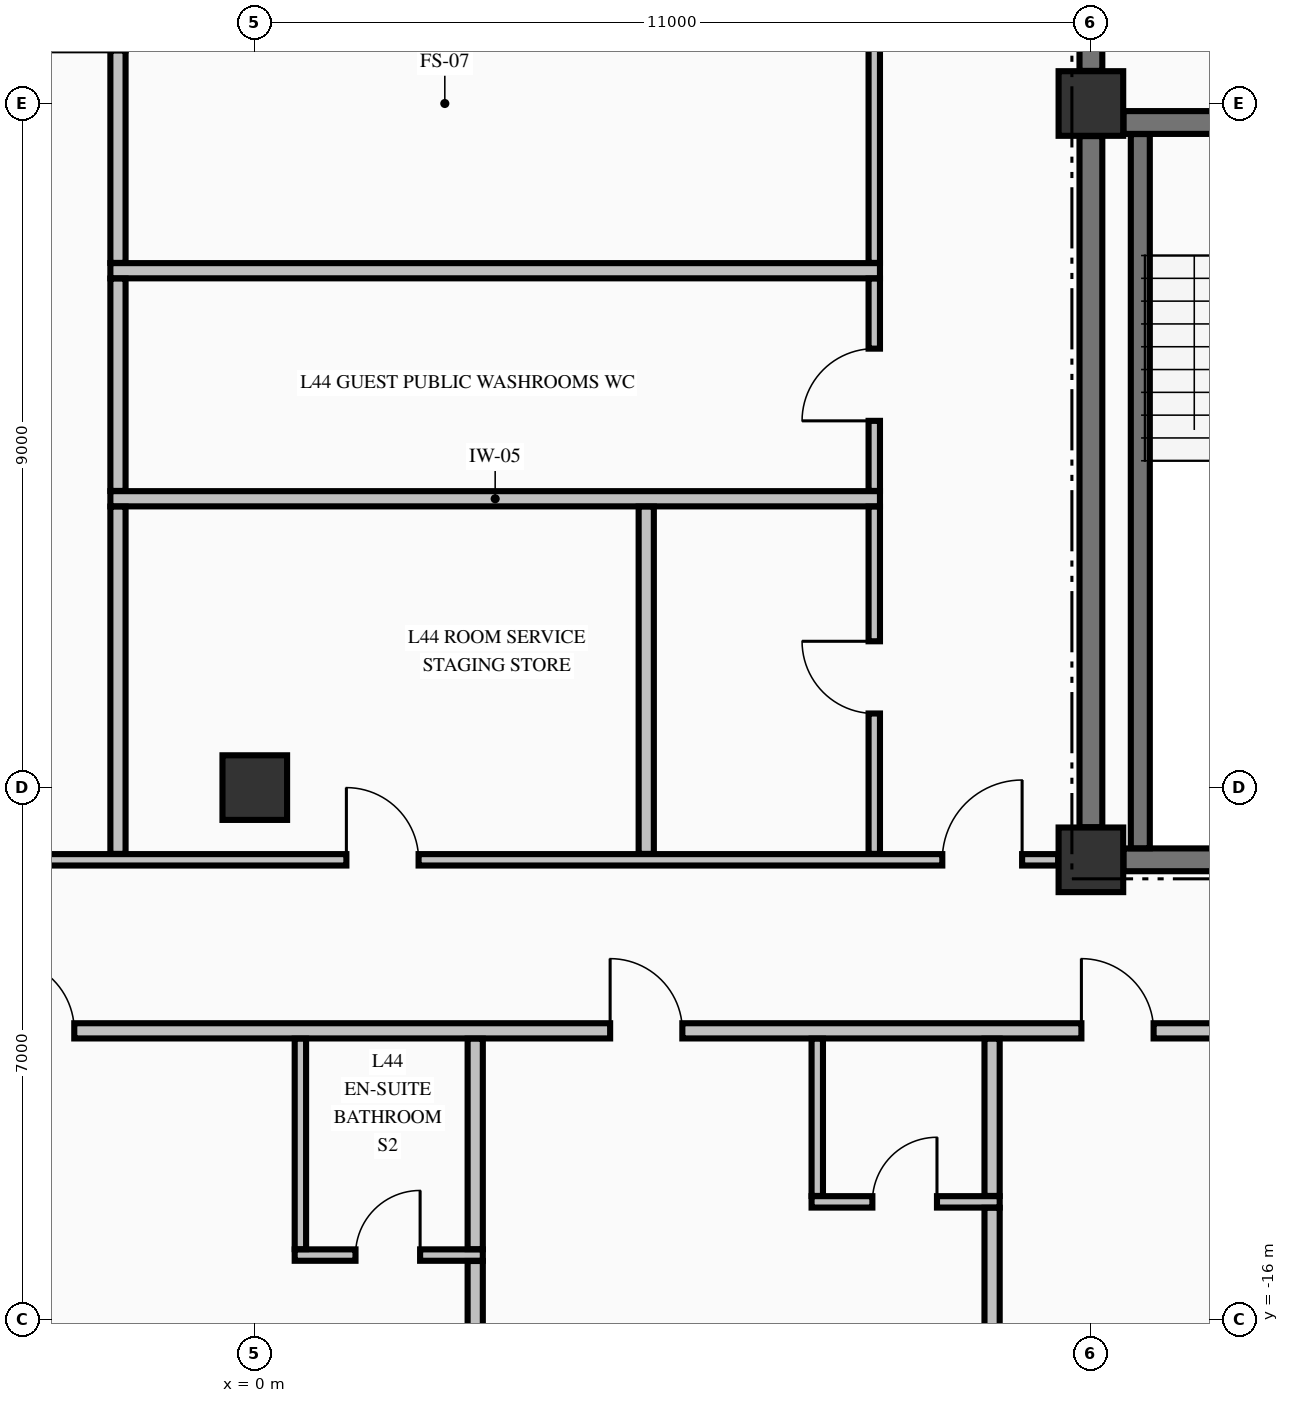
"""IFC4 building model, lengths in metres.
Left out: names, types, materials, properties, quantities, classifications, styles, units other than length and angle.
Written with IfcOpenShell. Run it as: python <this file> out.ifc"""

import sys

from ifc_helpers import new_model, si_unit, direction, frame, frame_2d, origin, origin_2d, place, context, subcontext, project, spatial, rectangle, extrude, element, fill, save


model = new_model("IFC4")
c1 = context("Model", 3, precision=1e-05, world=origin(), true_north=direction((0.0, 1.0)))
c2 = subcontext(c1, "Body", "Model", "MODEL_VIEW")
j1 = project(units=[si_unit("LENGTHUNIT", "METRE"), si_unit("PLANEANGLEUNIT", "RADIAN")], contexts=[c1])
p1 = place(None, origin())
s1 = spatial("IfcSite", under=j1, at=p1, CompositionType="ELEMENT")
p2 = place(p1, origin())
s2 = spatial("IfcBuilding", under=s1, at=p2, CompositionType="ELEMENT")
p3 = place(p2, frame((0.0, 0.0, 172.86)))
s3 = spatial("IfcBuildingStorey", under=s2, at=p3, CompositionType="ELEMENT", Elevation=172.86)
for number, where, z_axis, x_axis in (
    (1, (11.0, -9.95, -0.25), (0.0, 0.0, 1.0), (1.0, 0.0, 0.0)),
    (2, (11.0, 0.0, -0.25), (0.0, 0.0, 1.0), (1.0, 0.0, 0.0)),
    (3, (0.0, -9.0, -0.25), (0.0, 0.0, 1.0), (1.0, 0.0, 0.0)),
):
    element("IfcColumn", number, at=place(p3, frame(where, z_axis=z_axis, x_axis=x_axis)), inside=s3, PredefinedType="COLUMN", context=c2, shape_type="SweptSolid", body=[
        extrude(rectangle(XDim=0.85, YDim=0.85, at=origin_2d()), origin(), (0.0, 0.0, 1.0), 3.375),
    ])
p4 = place(p3, frame((11.429, -9.95, 0.0), z_axis=(0.0, 0.0, 1.0), x_axis=(1.0, 0.0, 0.0)))
e4 = element("IfcWall", 4, at=p4, inside=s3, PredefinedType="SHEAR", context=c2, shape_type="SweptSolid", body=[
    extrude(rectangle(XDim=3.271, YDim=0.3, at=frame_2d((1.635, 0.0))), origin(), (0.0, 0.0, 1.0), 3.125),
])
p5 = place(p3, frame((11.429, -0.25, 0.0), z_axis=(0.0, 0.0, 1.0), x_axis=(1.0, 0.0, 0.0)))
e5 = element("IfcWall", 5, at=p5, inside=s3, PredefinedType="SHEAR", context=c2, shape_type="SweptSolid", body=[
    extrude(rectangle(XDim=3.446, YDim=0.3, at=frame_2d((1.723, 0.0))), origin(), (0.0, 0.0, 1.0), 3.125),
])
p6 = place(p5, frame((1.171, 0.0, 0.0)))
e6 = element("IfcOpeningElement", 6, at=p6, cuts=e5, PredefinedType="OPENING", context=c2, shape_type="SweptSolid", body=[
    extrude(rectangle(XDim=1.1, YDim=2.15, at=frame_2d((0.55, 1.075))), frame((0.0, 0.16, 0.0), z_axis=(0.0, -1.0, 0.0), x_axis=(1.0, 0.0, 0.0)), (0.0, 0.0, 1.0), 0.32),
])
p7 = place(p3, frame((0.525, -15.15, 0.0), z_axis=(0.0, 0.0, 1.0), x_axis=(1.0, 0.0, 0.0)))
e7 = element("IfcWall", 7, at=p7, inside=s3, PredefinedType="PARTITIONING", context=c2, shape_type="SweptSolid", body=[
    extrude(rectangle(XDim=2.475, YDim=0.15, at=frame_2d((1.238, 0.0))), origin(), (0.0, 0.0, 1.0), 3.125),
])
p8 = place(p7, frame((0.8, 0.0, 0.0)))
e8 = element("IfcOpeningElement", 8, at=p8, cuts=e7, PredefinedType="OPENING", context=c2, shape_type="SweptSolid", body=[
    extrude(rectangle(XDim=0.85, YDim=2.1, at=frame_2d((0.425, 1.05))), frame((0.0, 0.085, 0.0), z_axis=(0.0, -1.0, 0.0), x_axis=(1.0, 0.0, 0.0)), (0.0, 0.0, 1.0), 0.17),
])
p9 = place(p3, frame((7.325, -14.45, 0.0), z_axis=(0.0, 0.0, 1.0), x_axis=(1.0, 0.0, 0.0)))
e9 = element("IfcWall", 9, at=p9, inside=s3, PredefinedType="PARTITIONING", context=c2, shape_type="SweptSolid", body=[
    extrude(rectangle(XDim=2.475, YDim=0.15, at=frame_2d((1.238, 0.0))), origin(), (0.0, 0.0, 1.0), 2.665),
])
p10 = place(p9, frame((0.8, 0.0, 0.0)))
e10 = element("IfcOpeningElement", 10, at=p10, cuts=e9, PredefinedType="OPENING", context=c2, shape_type="SweptSolid", body=[
    extrude(rectangle(XDim=0.85, YDim=2.1, at=frame_2d((0.425, 1.05))), frame((0.0, 0.085, 0.0), z_axis=(0.0, -1.0, 0.0), x_axis=(1.0, 0.0, 0.0)), (0.0, 0.0, 1.0), 0.17),
])
p11 = place(p3, frame((-17.1, -12.2, 0.0), z_axis=(0.0, 0.0, 1.0), x_axis=(1.0, 0.0, 0.0)))
e11 = element("IfcWall", 11, at=p11, inside=s3, PredefinedType="PARTITIONING", context=c2, shape_type="SweptSolid", body=[
    extrude(rectangle(XDim=39.2, YDim=0.2, at=frame_2d((19.6, 0.0))), origin(), (0.0, 0.0, 1.0), 3.125),
])
p12 = place(p11, frame((3.825, 0.0, 0.0)))
e12 = element("IfcOpeningElement", 12, at=p12, cuts=e11, PredefinedType="OPENING", context=c2, shape_type="SweptSolid", body=[
    extrude(rectangle(XDim=0.95, YDim=2.15, at=frame_2d((0.475, 1.075))), frame((0.0, 0.11, 0.0), z_axis=(0.0, -1.0, 0.0), x_axis=(1.0, 0.0, 0.0)), (0.0, 0.0, 1.0), 0.22),
])
p13 = place(p11, frame((13.775, 0.0, 0.0)))
e13 = element("IfcOpeningElement", 13, at=p13, cuts=e11, PredefinedType="OPENING", context=c2, shape_type="SweptSolid", body=[
    extrude(rectangle(XDim=0.95, YDim=2.15, at=frame_2d((0.475, 1.075))), frame((0.0, 0.11, 0.0), z_axis=(0.0, -1.0, 0.0), x_axis=(1.0, 0.0, 0.0)), (0.0, 0.0, 1.0), 0.22),
])
p14 = place(p11, frame((21.775, 0.0, 0.0)))
e14 = element("IfcOpeningElement", 14, at=p14, cuts=e11, PredefinedType="OPENING", context=c2, shape_type="SweptSolid", body=[
    extrude(rectangle(XDim=0.95, YDim=2.15, at=frame_2d((0.475, 1.075))), frame((0.0, 0.11, 0.0), z_axis=(0.0, -1.0, 0.0), x_axis=(1.0, 0.0, 0.0)), (0.0, 0.0, 1.0), 0.22),
])
p15 = place(p11, frame((27.975, 0.0, 0.0)))
e15 = element("IfcOpeningElement", 15, at=p15, cuts=e11, PredefinedType="OPENING", context=c2, shape_type="SweptSolid", body=[
    extrude(rectangle(XDim=0.95, YDim=2.15, at=frame_2d((0.475, 1.075))), frame((0.0, 0.11, 0.0), z_axis=(0.0, -1.0, 0.0), x_axis=(1.0, 0.0, 0.0)), (0.0, 0.0, 1.0), 0.22),
])
p16 = place(p11, frame((34.325, 0.0, 0.0)))
e16 = element("IfcOpeningElement", 16, at=p16, cuts=e11, PredefinedType="OPENING", context=c2, shape_type="SweptSolid", body=[
    extrude(rectangle(XDim=0.95, YDim=2.15, at=frame_2d((0.475, 1.075))), frame((0.0, 0.11, 0.0), z_axis=(0.0, -1.0, 0.0), x_axis=(1.0, 0.0, 0.0)), (0.0, 0.0, 1.0), 0.22),
])
p17 = place(p3, frame((-10.569, -9.95, 0.0), z_axis=(0.0, 0.0, 1.0), x_axis=(1.0, 0.0, 0.0)))
e17 = element("IfcWall", 17, at=p17, inside=s3, PredefinedType="PARTITIONING", context=c2, shape_type="SweptSolid", body=[
    extrude(rectangle(XDim=21.138, YDim=0.15, at=frame_2d((10.569, 0.0))), origin(), (0.0, 0.0, 1.0), 3.125),
])
p18 = place(p17, frame((0.474, 0.0, 0.0)))
e18 = element("IfcOpeningElement", 18, at=p18, cuts=e17, PredefinedType="OPENING", context=c2, shape_type="SweptSolid", body=[
    extrude(rectangle(XDim=1.05, YDim=2.15, at=frame_2d((0.525, 1.075))), frame((0.0, 0.085, 0.0), z_axis=(0.0, -1.0, 0.0), x_axis=(1.0, 0.0, 0.0)), (0.0, 0.0, 1.0), 0.17),
])
p19 = place(p17, frame((19.614, 0.0, 0.0)))
e19 = element("IfcOpeningElement", 19, at=p19, cuts=e17, PredefinedType="OPENING", context=c2, shape_type="SweptSolid", body=[
    extrude(rectangle(XDim=1.05, YDim=2.15, at=frame_2d((0.525, 1.075))), frame((0.0, 0.085, 0.0), z_axis=(0.0, -1.0, 0.0), x_axis=(1.0, 0.0, 0.0)), (0.0, 0.0, 1.0), 0.17),
])
p20 = place(p17, frame((11.774, 0.0, 0.0)))
e20 = element("IfcOpeningElement", 20, at=p20, cuts=e17, PredefinedType="OPENING", context=c2, shape_type="SweptSolid", body=[
    extrude(rectangle(XDim=0.95, YDim=2.15, at=frame_2d((0.475, 1.075))), frame((0.0, 0.085, 0.0), z_axis=(0.0, -1.0, 0.0), x_axis=(1.0, 0.0, 0.0)), (0.0, 0.0, 1.0), 0.17),
])
for number, where, z_axis, x_axis in (
    (21, (-1.9, -5.2, 0.0), (0.0, 0.0, 1.0), (1.0, 0.0, 0.0)),
    (22, (-1.9, -2.2, 0.0), (0.0, 0.0, 1.0), (1.0, 0.0, 0.0)),
):
    element("IfcWall", number, at=place(p3, frame(where, z_axis=z_axis, x_axis=x_axis)), inside=s3, PredefinedType="PARTITIONING", context=c2, shape_type="SweptSolid", body=[
        extrude(rectangle(XDim=10.125, YDim=0.2, at=frame_2d((5.062, 0.0))), origin(), (0.0, 0.0, 1.0), 3.125),
    ])
p21 = place(p3, frame((11.0, -9.521, 0.0), z_axis=(0.0, 0.0, 1.0), x_axis=(0.0, 1.0, 0.0)))
e23 = element("IfcWall", 23, at=p21, inside=s3, PredefinedType="SHEAR", context=c2, shape_type="SweptSolid", body=[
    extrude(rectangle(XDim=9.092, YDim=0.3, at=frame_2d((4.546, 0.0))), origin(), (0.0, 0.0, 1.0), 3.125),
])
p22 = place(p3, frame((11.0, 0.429, 0.0), z_axis=(0.0, 0.0, 1.0), x_axis=(0.0, 1.0, 0.0)))
e24 = element("IfcWall", 24, at=p22, inside=s3, PredefinedType="SHEAR", context=c2, shape_type="SweptSolid", body=[
    extrude(rectangle(XDim=2.319, YDim=0.3, at=frame_2d((1.16, 0.0))), origin(), (0.0, 0.0, 1.0), 3.125),
])
p23 = place(p22, frame((0.671, 0.0, 0.0)))
e25 = element("IfcOpeningElement", 25, at=p23, cuts=e24, PredefinedType="OPENING", context=c2, shape_type="SweptSolid", body=[
    extrude(rectangle(XDim=1.1, YDim=2.15, at=frame_2d((0.55, 1.075))), frame((0.0, 0.16, 0.0), z_axis=(0.0, -1.0, 0.0), x_axis=(1.0, 0.0, 0.0)), (0.0, 0.0, 1.0), 0.32),
])
p24 = place(p3, frame((11.65, -9.798, 0.0), z_axis=(0.0, 0.0, 1.0), x_axis=(0.0, 1.0, 0.0)))
e26 = element("IfcWall", 26, at=p24, inside=s3, PredefinedType="SOLIDWALL", context=c2, shape_type="SweptSolid", body=[
    extrude(rectangle(XDim=9.396, YDim=0.25, at=frame_2d((4.698, 0.0))), origin(), (0.0, 0.0, 1.0), 3.125),
])
p25 = place(p3, frame((-1.8, -9.872, 0.0), z_axis=(0.0, 0.0, 1.0), x_axis=(0.0, 1.0, 0.0)))
e27 = element("IfcWall", 27, at=p25, inside=s3, PredefinedType="PARTITIONING", context=c2, shape_type="SweptSolid", body=[
    extrude(rectangle(XDim=4.569, YDim=0.2, at=frame_2d((2.285, 0.0))), origin(), (0.0, 0.0, 1.0), 3.125),
])
for number, where, z_axis, x_axis in (
    (28, (-1.8, -5.097, 0.0), (0.0, 0.0, 1.0), (0.0, 1.0, 0.0)),
    (29, (-1.8, -2.097, 0.0), (0.0, 0.0, 1.0), (0.0, 1.0, 0.0)),
):
    element("IfcWall", number, at=place(p3, frame(where, z_axis=z_axis, x_axis=x_axis)), inside=s3, PredefinedType="PARTITIONING", context=c2, shape_type="SweptSolid", body=[
        extrude(rectangle(XDim=2.794, YDim=0.2, at=frame_2d((1.397, 0.0))), origin(), (0.0, 0.0, 1.0), 3.125),
    ])
p26 = place(p3, frame((0.6, -15.072, 0.0), z_axis=(0.0, 0.0, 1.0), x_axis=(0.0, 1.0, 0.0)))
e30 = element("IfcWall", 30, at=p26, inside=s3, PredefinedType="PARTITIONING", context=c2, shape_type="SweptSolid", body=[
    extrude(rectangle(XDim=2.769, YDim=0.15, at=frame_2d((1.385, 0.0))), origin(), (0.0, 0.0, 1.0), 3.125),
])
p27 = place(p3, frame((2.9, -24.335, 0.0), z_axis=(0.0, 0.0, 1.0), x_axis=(0.0, 1.0, 0.0)))
e31 = element("IfcWall", 31, at=p27, inside=s3, PredefinedType="PARTITIONING", context=c2, shape_type="SweptSolid", body=[
    extrude(rectangle(XDim=9.107, YDim=0.2, at=frame_2d((4.553, 0.0))), origin(), (0.0, 0.0, 1.0), 3.125),
])
p28 = place(p3, frame((2.9, -15.072, 0.0), z_axis=(0.0, 0.0, 1.0), x_axis=(0.0, 1.0, 0.0)))
e32 = element("IfcWall", 32, at=p28, inside=s3, PredefinedType="PARTITIONING", context=c2, shape_type="SweptSolid", body=[
    extrude(rectangle(XDim=2.769, YDim=0.2, at=frame_2d((1.385, 0.0))), origin(), (0.0, 0.0, 1.0), 3.125),
])
p29 = place(p3, frame((5.15, -9.872, 0.0), z_axis=(0.0, 0.0, 1.0), x_axis=(0.0, 1.0, 0.0)))
e33 = element("IfcWall", 33, at=p29, inside=s3, PredefinedType="PARTITIONING", context=c2, shape_type="SweptSolid", body=[
    extrude(rectangle(XDim=4.569, YDim=0.2, at=frame_2d((2.285, 0.0))), origin(), (0.0, 0.0, 1.0), 3.125),
])
p30 = place(p3, frame((7.4, -14.372, 0.0), z_axis=(0.0, 0.0, 1.0), x_axis=(0.0, 1.0, 0.0)))
e34 = element("IfcWall", 34, at=p30, inside=s3, PredefinedType="PARTITIONING", context=c2, shape_type="SweptSolid", body=[
    extrude(rectangle(XDim=2.069, YDim=0.15, at=frame_2d((1.035, 0.0))), origin(), (0.0, 0.0, 1.0), 3.125),
])
p31 = place(p3, frame((8.15, -9.872, 0.0), z_axis=(0.0, 0.0, 1.0), x_axis=(0.0, 1.0, 0.0)))
e35 = element("IfcWall", 35, at=p31, inside=s3, PredefinedType="PARTITIONING", context=c2, shape_type="SweptSolid", body=[
    extrude(rectangle(XDim=4.569, YDim=0.15, at=frame_2d((2.285, 0.0))), origin(), (0.0, 0.0, 1.0), 3.125),
])
p32 = place(p31, frame((1.847, 0.0, 0.0)))
e36 = element("IfcOpeningElement", 36, at=p32, cuts=e35, PredefinedType="OPENING", context=c2, shape_type="SweptSolid", body=[
    extrude(rectangle(XDim=0.95, YDim=2.15, at=frame_2d((0.475, 1.075))), frame((0.0, 0.085, 0.0), z_axis=(0.0, -1.0, 0.0), x_axis=(1.0, 0.0, 0.0)), (0.0, 0.0, 1.0), 0.17),
])
p33 = place(p3, frame((8.15, -5.097, 0.0), z_axis=(0.0, 0.0, 1.0), x_axis=(0.0, 1.0, 0.0)))
e37 = element("IfcWall", 37, at=p33, inside=s3, PredefinedType="PARTITIONING", context=c2, shape_type="SweptSolid", body=[
    extrude(rectangle(XDim=2.794, YDim=0.15, at=frame_2d((1.397, 0.0))), origin(), (0.0, 0.0, 1.0), 3.125),
])
p34 = place(p33, frame((0.922, 0.0, 0.0)))
e38 = element("IfcOpeningElement", 38, at=p34, cuts=e37, PredefinedType="OPENING", context=c2, shape_type="SweptSolid", body=[
    extrude(rectangle(XDim=0.95, YDim=2.15, at=frame_2d((0.475, 1.075))), frame((0.0, 0.085, 0.0), z_axis=(0.0, -1.0, 0.0), x_axis=(1.0, 0.0, 0.0)), (0.0, 0.0, 1.0), 0.17),
])
p35 = place(p3, frame((8.15, -2.097, 0.0), z_axis=(0.0, 0.0, 1.0), x_axis=(0.0, 1.0, 0.0)))
e39 = element("IfcWall", 39, at=p35, inside=s3, PredefinedType="PARTITIONING", context=c2, shape_type="SweptSolid", body=[
    extrude(rectangle(XDim=12.519, YDim=0.15, at=frame_2d((6.26, 0.0))), origin(), (0.0, 0.0, 1.0), 3.125),
])
p36 = place(p35, frame((5.697, 0.0, 0.0)))
e40 = element("IfcOpeningElement", 40, at=p36, cuts=e39, PredefinedType="OPENING", context=c2, shape_type="SweptSolid", body=[
    extrude(rectangle(XDim=1.1, YDim=2.15, at=frame_2d((0.55, 1.075))), frame((0.0, 0.085, 0.0), z_axis=(0.0, -1.0, 0.0), x_axis=(1.0, 0.0, 0.0)), (0.0, 0.0, 1.0), 0.17),
])
p37 = place(p3, frame((9.7, -24.335, 0.0), z_axis=(0.0, 0.0, 1.0), x_axis=(0.0, 1.0, 0.0)))
e41 = element("IfcWall", 41, at=p37, inside=s3, PredefinedType="PARTITIONING", context=c2, shape_type="SweptSolid", body=[
    extrude(rectangle(XDim=9.807, YDim=0.2, at=frame_2d((4.903, 0.0))), origin(), (0.0, 0.0, 1.0), 3.125),
])
p38 = place(p3, frame((9.7, -14.372, 0.0), z_axis=(0.0, 0.0, 1.0), x_axis=(0.0, 1.0, 0.0)))
e42 = element("IfcWall", 42, at=p38, inside=s3, PredefinedType="PARTITIONING", context=c2, shape_type="SweptSolid", body=[
    extrude(rectangle(XDim=2.069, YDim=0.2, at=frame_2d((1.035, 0.0))), origin(), (0.0, 0.0, 1.0), 3.125),
])
p39 = place(p19, origin())
e43 = element("IfcDoor", 43, at=p39, inside=s3, OperationType="SINGLE_SWING_RIGHT", PredefinedType="DOOR", context=c2, shape_type="SweptSolid", body=[
    extrude(rectangle(XDim=1.05, YDim=2.15, at=frame_2d((0.525, 1.075))), frame((0.0, 0.025, 0.0), z_axis=(0.0, -1.0, 0.0), x_axis=(1.0, 0.0, 0.0)), (0.0, 0.0, 1.0), 0.05),
])
fill(e19, e43)
p40 = place(p13, origin())
e44 = element("IfcDoor", 44, at=p40, inside=s3, OperationType="SINGLE_SWING_LEFT", PredefinedType="DOOR", context=c2, shape_type="SweptSolid", body=[
    extrude(rectangle(XDim=0.95, YDim=2.15, at=frame_2d((0.475, 1.075))), frame((0.0, 0.025, 0.0), z_axis=(0.0, -1.0, 0.0), x_axis=(1.0, 0.0, 0.0)), (0.0, 0.0, 1.0), 0.05),
])
fill(e13, e44)
p41 = place(p8, origin())
e45 = element("IfcDoor", 45, at=p41, inside=s3, OperationType="SINGLE_SWING_RIGHT", PredefinedType="DOOR", context=c2, shape_type="SweptSolid", body=[
    extrude(rectangle(XDim=0.85, YDim=2.1, at=frame_2d((0.425, 1.05))), frame((0.0, 0.025, 0.0), z_axis=(0.0, -1.0, 0.0), x_axis=(1.0, 0.0, 0.0)), (0.0, 0.0, 1.0), 0.05),
])
fill(e8, e45)
p42 = place(p14, origin())
e46 = element("IfcDoor", 46, at=p42, inside=s3, OperationType="SINGLE_SWING_LEFT", PredefinedType="DOOR", context=c2, shape_type="SweptSolid", body=[
    extrude(rectangle(XDim=0.95, YDim=2.15, at=frame_2d((0.475, 1.075))), frame((0.0, 0.025, 0.0), z_axis=(0.0, -1.0, 0.0), x_axis=(1.0, 0.0, 0.0)), (0.0, 0.0, 1.0), 0.05),
])
fill(e14, e46)
p43 = place(p10, origin())
e47 = element("IfcDoor", 47, at=p43, inside=s3, OperationType="SINGLE_SWING_RIGHT", PredefinedType="DOOR", context=c2, shape_type="SweptSolid", body=[
    extrude(rectangle(XDim=0.85, YDim=2.1, at=frame_2d((0.425, 1.05))), frame((0.0, 0.025, 0.0), z_axis=(0.0, -1.0, 0.0), x_axis=(1.0, 0.0, 0.0)), (0.0, 0.0, 1.0), 0.05),
])
fill(e10, e47)
p44 = place(p15, origin())
e48 = element("IfcDoor", 48, at=p44, inside=s3, OperationType="SINGLE_SWING_LEFT", PredefinedType="DOOR", context=c2, shape_type="SweptSolid", body=[
    extrude(rectangle(XDim=0.95, YDim=2.15, at=frame_2d((0.475, 1.075))), frame((0.0, 0.025, 0.0), z_axis=(0.0, -1.0, 0.0), x_axis=(1.0, 0.0, 0.0)), (0.0, 0.0, 1.0), 0.05),
])
fill(e15, e48)
p45 = place(p34, origin())
e49 = element("IfcDoor", 49, at=p45, inside=s3, OperationType="SINGLE_SWING_LEFT", PredefinedType="DOOR", context=c2, shape_type="SweptSolid", body=[
    extrude(rectangle(XDim=0.95, YDim=2.15, at=frame_2d((0.475, 1.075))), frame((0.0, 0.025, 0.0), z_axis=(0.0, -1.0, 0.0), x_axis=(1.0, 0.0, 0.0)), (0.0, 0.0, 1.0), 0.05),
])
fill(e38, e49)
p46 = place(p32, origin())
e50 = element("IfcDoor", 50, at=p46, inside=s3, OperationType="SINGLE_SWING_RIGHT", PredefinedType="DOOR", context=c2, shape_type="SweptSolid", body=[
    extrude(rectangle(XDim=0.95, YDim=2.15, at=frame_2d((0.475, 1.075))), frame((0.0, 0.025, 0.0), z_axis=(0.0, -1.0, 0.0), x_axis=(1.0, 0.0, 0.0)), (0.0, 0.0, 1.0), 0.05),
])
fill(e36, e50)
p47 = place(p20, origin())
e51 = element("IfcDoor", 51, at=p47, inside=s3, OperationType="SINGLE_SWING_LEFT", PredefinedType="DOOR", context=c2, shape_type="SweptSolid", body=[
    extrude(rectangle(XDim=0.95, YDim=2.15, at=frame_2d((0.475, 1.075))), frame((0.0, 0.025, 0.0), z_axis=(0.0, -1.0, 0.0), x_axis=(1.0, 0.0, 0.0)), (0.0, 0.0, 1.0), 0.05),
])
fill(e20, e51)
save(model, sys.argv[1])
